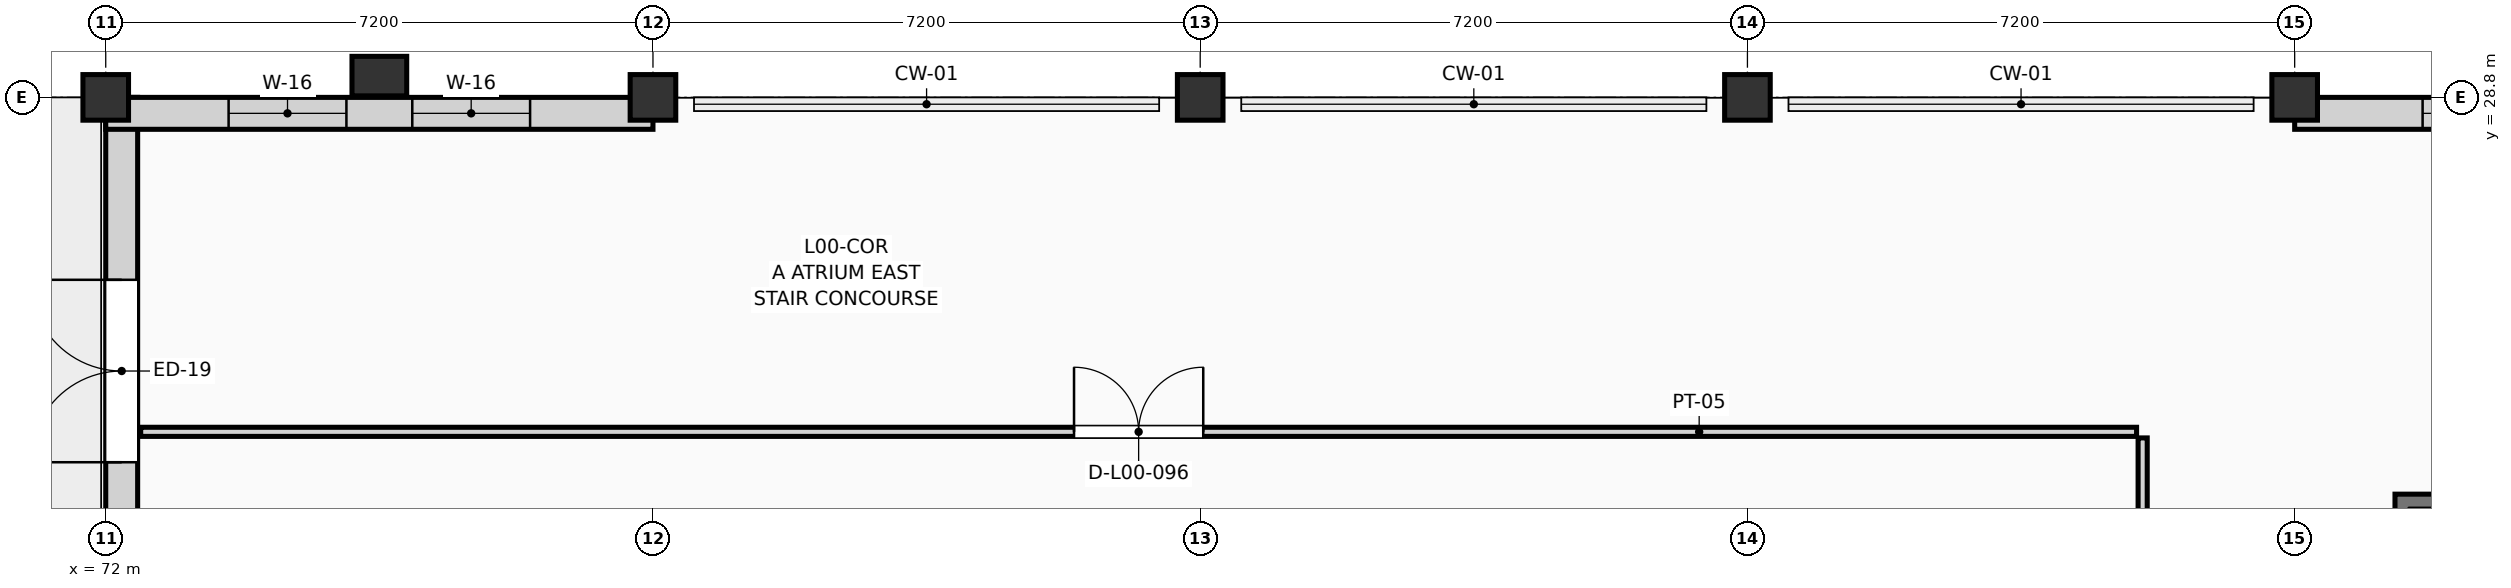
"""IFC4 building model, lengths in metres.
Left out: names, types, materials, properties, quantities, classifications, styles, units other than length and angle.
Written with IfcOpenShell. Run it as: python <this file> out.ifc"""

import sys

from ifc_helpers import new_model, si_unit, direction, frame, frame_2d, origin, origin_2d, place, context, subcontext, project, spatial, rectangle, extrude, element, fill, save


model = new_model("IFC4")
c1 = context("Model", 3, precision=1e-05, world=origin(), true_north=direction((0.0, 1.0)))
c2 = subcontext(c1, "Body", "Model", "MODEL_VIEW")
j1 = project(units=[si_unit("LENGTHUNIT", "METRE"), si_unit("PLANEANGLEUNIT", "RADIAN")], contexts=[c1])
p1 = place(None, origin())
s1 = spatial("IfcSite", under=j1, at=p1, CompositionType="ELEMENT")
p2 = place(p1, origin())
s2 = spatial("IfcBuilding", under=s1, at=p2, CompositionType="ELEMENT")
p3 = place(p2, origin())
s3 = spatial("IfcBuildingStorey", under=s2, at=p3, CompositionType="ELEMENT", Elevation=0.0)
for number, where, z_axis, x_axis in (
    (1, (72.0, 28.8, 0.0), (0.0, 0.0, 1.0), (1.0, 0.0, 0.0)),
    (2, (79.2, 28.8, 0.0), (0.0, 0.0, 1.0), (1.0, 0.0, 0.0)),
    (3, (86.4, 28.8, 0.0), (0.0, 0.0, 1.0), (1.0, 0.0, 0.0)),
    (4, (93.6, 28.8, 0.0), (0.0, 0.0, 1.0), (1.0, 0.0, 0.0)),
    (5, (100.8, 28.8, 0.0), (0.0, 0.0, 1.0), (1.0, 0.0, 0.0)),
):
    element("IfcColumn", number, at=place(p3, frame(where, z_axis=z_axis, x_axis=x_axis)), inside=s3, PredefinedType="COLUMN", context=c2, shape_type="SweptSolid", body=[
        extrude(rectangle(XDim=0.6, YDim=0.6, at=origin_2d()), origin(), (0.0, 0.0, 1.0), 4.5),
    ])
p4 = place(p3, frame((75.6, 29.08, 0.0), z_axis=(0.0, 0.0, 1.0), x_axis=(0.0, 1.0, 0.0)))
e6 = element("IfcColumn", 6, at=p4, inside=s3, PredefinedType="PILASTER", context=c2, shape_type="SweptSolid", body=[
    extrude(rectangle(XDim=0.52, YDim=0.72, at=origin_2d()), origin(), (0.0, 0.0, 1.0), 4.5),
])
p5 = place(p3, frame((72.21, 21.6, 0.0), z_axis=(0.0, 0.0, 1.0), x_axis=(0.0, 1.0, 0.0)))
e7 = element("IfcWall", 7, at=p5, inside=s3, PredefinedType="SOLIDWALL", context=c2, shape_type="SweptSolid", body=[
    extrude(rectangle(XDim=7.2, YDim=0.42, at=frame_2d((3.6, 0.0))), origin(), (0.0, 0.0, 1.0), 3.62),
])
p6 = place(p5, frame((2.4, 0.0, 0.0)))
e8 = element("IfcOpeningElement", 8, at=p6, cuts=e7, PredefinedType="OPENING", context=c2, shape_type="SweptSolid", body=[
    extrude(rectangle(XDim=2.4, YDim=2.6, at=frame_2d((1.2, 1.3))), frame((0.0, 0.222, 0.0), z_axis=(0.0, -1.0, 0.0), x_axis=(1.0, 0.0, 0.0)), (0.0, 0.0, 1.0), 0.444),
])
p7 = place(p3, frame((72.0, 28.59, 0.0), z_axis=(0.0, 0.0, 1.0), x_axis=(1.0, 0.0, 0.0)))
e9 = element("IfcWall", 9, at=p7, inside=s3, PredefinedType="SOLIDWALL", context=c2, shape_type="SweptSolid", body=[
    extrude(rectangle(XDim=7.2, YDim=0.42, at=frame_2d((3.6, 0.0))), origin(), (0.0, 0.0, 1.0), 3.62),
])
p8 = place(p7, frame((1.617, 0.0, 0.45)))
e10 = element("IfcOpeningElement", 10, at=p8, cuts=e9, PredefinedType="OPENING", context=c2, shape_type="SweptSolid", body=[
    extrude(rectangle(XDim=1.55, YDim=2.55, at=frame_2d((0.775, 1.275))), frame((0.0, 0.222, 0.0), z_axis=(0.0, -1.0, 0.0), x_axis=(1.0, 0.0, 0.0)), (0.0, 0.0, 1.0), 0.444),
])
p9 = place(p7, frame((4.033, 0.0, 0.45)))
e11 = element("IfcOpeningElement", 11, at=p9, cuts=e9, PredefinedType="OPENING", context=c2, shape_type="SweptSolid", body=[
    extrude(rectangle(XDim=1.55, YDim=2.55, at=frame_2d((0.775, 1.275))), frame((0.0, 0.222, 0.0), z_axis=(0.0, -1.0, 0.0), x_axis=(1.0, 0.0, 0.0)), (0.0, 0.0, 1.0), 0.444),
])
p10 = place(p3, frame((100.8, 28.59, 0.0), z_axis=(0.0, 0.0, 1.0), x_axis=(1.0, 0.0, 0.0)))
e12 = element("IfcWall", 12, at=p10, inside=s3, PredefinedType="SOLIDWALL", context=c2, shape_type="SweptSolid", body=[
    extrude(rectangle(XDim=7.2, YDim=0.42, at=frame_2d((3.6, 0.0))), origin(), (0.0, 0.0, 1.0), 3.62),
])
p11 = place(p10, frame((1.683, 0.0, 0.45)))
e13 = element("IfcOpeningElement", 13, at=p11, cuts=e12, PredefinedType="OPENING", context=c2, shape_type="SweptSolid", body=[
    extrude(rectangle(XDim=1.45, YDim=2.5, at=frame_2d((0.725, 1.25))), frame((0.0, 0.222, 0.0), z_axis=(0.0, -1.0, 0.0), x_axis=(1.0, 0.0, 0.0)), (0.0, 0.0, 1.0), 0.444),
])
p12 = place(p10, frame((4.067, 0.0, 0.45)))
e14 = element("IfcOpeningElement", 14, at=p12, cuts=e12, PredefinedType="OPENING", context=c2, shape_type="SweptSolid", body=[
    extrude(rectangle(XDim=1.45, YDim=2.5, at=frame_2d((0.725, 1.25))), frame((0.0, 0.222, 0.0), z_axis=(0.0, -1.0, 0.0), x_axis=(1.0, 0.0, 0.0)), (0.0, 0.0, 1.0), 0.444),
])
p13 = place(p3, frame((102.12, 23.4, 0.0), z_axis=(0.0, 0.0, 1.0), x_axis=(1.0, 0.0, 0.0)))
e15 = element("IfcWall", 15, at=p13, inside=s3, PredefinedType="SHEAR", context=c2, shape_type="SweptSolid", body=[
    extrude(rectangle(XDim=4.48, YDim=0.36, at=frame_2d((2.24, 0.0))), origin(), (0.0, 0.0, 1.0), 4.25),
])
p14 = place(p3, frame((98.8, 0.48, 0.0), z_axis=(0.0, 0.0, 1.0), x_axis=(0.0, 1.0, 0.0)))
e16 = element("IfcWall", 16, at=p14, inside=s3, PredefinedType="PARTITIONING", context=c2, shape_type="SweptSolid", body=[
    extrude(rectangle(XDim=23.84, YDim=0.12, at=frame_2d((11.92, 0.0))), origin(), (0.0, 0.0, 1.0), 4.235),
])
p15 = place(p3, frame((72.46, 24.4, 0.0), z_axis=(0.0, 0.0, 1.0), x_axis=(1.0, 0.0, 0.0)))
e17 = element("IfcWall", 17, at=p15, inside=s3, PredefinedType="PARTITIONING", context=c2, shape_type="SweptSolid", body=[
    extrude(rectangle(XDim=26.26, YDim=0.12, at=frame_2d((13.13, 0.0))), origin(), (0.0, 0.0, 1.0), 4.235),
])
p16 = place(p15, frame((12.28, 0.0, 0.0)))
e18 = element("IfcOpeningElement", 18, at=p16, cuts=e17, PredefinedType="OPENING", context=c2, shape_type="SweptSolid", body=[
    extrude(rectangle(XDim=1.7, YDim=2.28, at=frame_2d((0.85, 1.14))), frame((0.0, 0.072, 0.0), z_axis=(0.0, -1.0, 0.0), x_axis=(1.0, 0.0, 0.0)), (0.0, 0.0, 1.0), 0.144),
])
p17 = place(p6, origin())
e19 = element("IfcDoor", 19, at=p17, inside=s3, OperationType="DOUBLE_DOOR_SINGLE_SWING", PredefinedType="DOOR", context=c2, shape_type="SweptSolid", body=[
    extrude(rectangle(XDim=2.4, YDim=2.6, at=frame_2d((1.2, 1.3))), frame((0.0, 0.025, 0.0), z_axis=(0.0, -1.0, 0.0), x_axis=(1.0, 0.0, 0.0)), (0.0, 0.0, 1.0), 0.05),
])
fill(e8, e19)
p18 = place(p8, origin())
e20 = element("IfcWindow", 20, at=p18, inside=s3, PartitioningType="SINGLE_PANEL", PredefinedType="WINDOW", context=c2, shape_type="SweptSolid", body=[
    extrude(rectangle(XDim=1.55, YDim=2.55, at=frame_2d((0.775, 1.275))), frame((0.0, 0.03, 0.0), z_axis=(0.0, -1.0, 0.0), x_axis=(1.0, 0.0, 0.0)), (0.0, 0.0, 1.0), 0.06),
])
fill(e10, e20)
p19 = place(p9, origin())
e21 = element("IfcWindow", 21, at=p19, inside=s3, PartitioningType="SINGLE_PANEL", PredefinedType="WINDOW", context=c2, shape_type="SweptSolid", body=[
    extrude(rectangle(XDim=1.55, YDim=2.55, at=frame_2d((0.775, 1.275))), frame((0.0, 0.03, 0.0), z_axis=(0.0, -1.0, 0.0), x_axis=(1.0, 0.0, 0.0)), (0.0, 0.0, 1.0), 0.06),
])
fill(e11, e21)
p20 = place(p11, origin())
e22 = element("IfcWindow", 22, at=p20, inside=s3, PartitioningType="SINGLE_PANEL", PredefinedType="WINDOW", context=c2, shape_type="SweptSolid", body=[
    extrude(rectangle(XDim=1.45, YDim=2.5, at=frame_2d((0.725, 1.25))), frame((0.0, 0.03, 0.0), z_axis=(0.0, -1.0, 0.0), x_axis=(1.0, 0.0, 0.0)), (0.0, 0.0, 1.0), 0.06),
])
fill(e13, e22)
p21 = place(p16, origin())
e23 = element("IfcDoor", 23, at=p21, inside=s3, OperationType="DOUBLE_DOOR_SINGLE_SWING", PredefinedType="DOOR", context=c2, shape_type="SweptSolid", body=[
    extrude(rectangle(XDim=1.7, YDim=2.28, at=frame_2d((0.85, 1.14))), frame((0.0, 0.025, 0.0), z_axis=(0.0, -1.0, 0.0), x_axis=(1.0, 0.0, 0.0)), (0.0, 0.0, 1.0), 0.05),
])
fill(e18, e23)
save(model, sys.argv[1])
